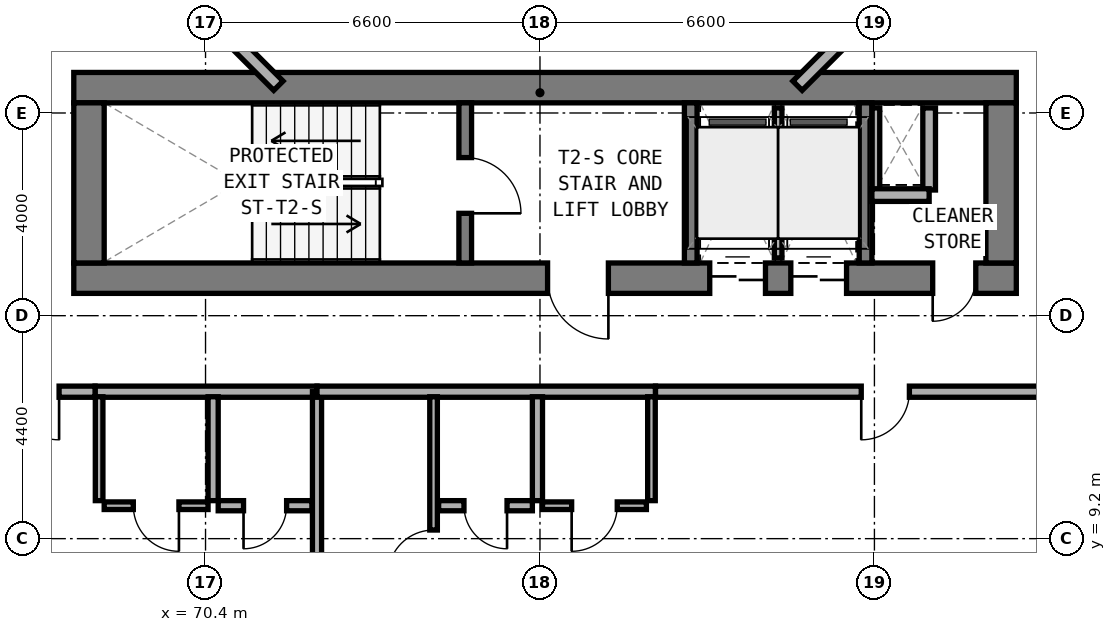
"""IFC4 building model, lengths in metres.
Left out: names, types, materials, properties, quantities, classifications, styles, units other than length and angle.
Written with IfcOpenShell. Run it as: python <this file> out.ifc"""

import sys

from ifc_helpers import new_model, si_unit, direction, frame, frame_2d, origin, place, context, subcontext, project, spatial, rectangle, extrude, element, fill, save


model = new_model("IFC4")
c1 = context("Model", 3, precision=1e-05, world=origin(), true_north=direction((0.0, 1.0)))
c2 = subcontext(c1, "Body", "Model", "MODEL_VIEW")
j1 = project(units=[si_unit("LENGTHUNIT", "METRE"), si_unit("PLANEANGLEUNIT", "RADIAN")], contexts=[c1])
p1 = place(None, origin())
s1 = spatial("IfcSite", under=j1, at=p1, CompositionType="ELEMENT")
p2 = place(p1, origin())
s2 = spatial("IfcBuilding", under=s1, at=p2, CompositionType="ELEMENT")
p3 = place(p2, frame((0.0, 0.0, 27.5)))
s3 = spatial("IfcBuildingStorey", under=s2, at=p3, CompositionType="ELEMENT", Elevation=27.5)
p4 = place(p3, frame((67.8, 14.34, 0.0), z_axis=(0.0, 0.0, 1.0), x_axis=(1.0, 0.0, 0.0)))
e1 = element("IfcWall", 1, at=p4, inside=s3, PredefinedType="SHEAR", context=c2, shape_type="SweptSolid", body=[
    extrude(rectangle(XDim=18.6, YDim=0.6, at=frame_2d((9.3, 0.0))), origin(), (0.0, 0.0, 1.0), 3.5),
])
p5 = place(p4, frame((9.35, 0.0, 0.0)))
e2 = element("IfcOpeningElement", 2, at=p5, cuts=e1, PredefinedType="OPENING", context=c2, shape_type="SweptSolid", body=[
    extrude(rectangle(XDim=1.2, YDim=2.15, at=frame_2d((0.6, 1.075))), frame((0.0, 0.31, 0.0), z_axis=(0.0, -1.0, 0.0), x_axis=(1.0, 0.0, 0.0)), (0.0, 0.0, 1.0), 0.62),
])
p6 = place(p4, frame((16.95, 0.0, 0.0)))
e3 = element("IfcOpeningElement", 3, at=p6, cuts=e1, PredefinedType="OPENING", context=c2, shape_type="SweptSolid", body=[
    extrude(rectangle(XDim=0.85, YDim=2.1, at=frame_2d((0.425, 1.05))), frame((0.0, 0.31, 0.0), z_axis=(0.0, -1.0, 0.0), x_axis=(1.0, 0.0, 0.0)), (0.0, 0.0, 1.0), 0.62),
])
p7 = place(p4, frame((12.55, 0.0, 0.0)))
e4 = element("IfcOpeningElement", 4, at=p7, cuts=e1, PredefinedType="OPENING", context=c2, shape_type="SweptSolid", body=[
    extrude(rectangle(XDim=1.1, YDim=2.15, at=frame_2d((0.55, 1.075))), frame((0.0, 0.31, 0.0), z_axis=(0.0, -1.0, 0.0), x_axis=(1.0, 0.0, 0.0)), (0.0, 0.0, 1.0), 0.62),
])
p8 = place(p4, frame((14.15, 0.0, 0.0)))
e5 = element("IfcOpeningElement", 5, at=p8, cuts=e1, PredefinedType="OPENING", context=c2, shape_type="SweptSolid", body=[
    extrude(rectangle(XDim=1.1, YDim=2.15, at=frame_2d((0.55, 1.075))), frame((0.0, 0.31, 0.0), z_axis=(0.0, -1.0, 0.0), x_axis=(1.0, 0.0, 0.0)), (0.0, 0.0, 1.0), 0.62),
])
p9 = place(p3, frame((67.8, 18.1, 0.0), z_axis=(0.0, 0.0, 1.0), x_axis=(1.0, 0.0, 0.0)))
e6 = element("IfcWall", 6, at=p9, inside=s3, PredefinedType="SHEAR", context=c2, shape_type="SweptSolid", body=[
    extrude(rectangle(XDim=18.6, YDim=0.6, at=frame_2d((9.3, 0.0))), origin(), (0.0, 0.0, 1.0), 3.5),
])
for number, where, z_axis, x_axis in (
    (7, (68.1, 14.64, 0.0), (0.0, 0.0, 1.0), (0.0, 1.0, 0.0)),
    (8, (86.1, 14.64, 0.0), (0.0, 0.0, 1.0), (0.0, 1.0, 0.0)),
):
    element("IfcWall", number, at=place(p3, frame(where, z_axis=z_axis, x_axis=x_axis)), inside=s3, PredefinedType="SHEAR", context=c2, shape_type="SweptSolid", body=[
        extrude(rectangle(XDim=3.16, YDim=0.6, at=frame_2d((1.58, 0.0))), origin(), (0.0, 0.0, 1.0), 3.5),
    ])
p10 = place(p3, frame((75.525, 14.64, 0.0), z_axis=(0.0, 0.0, 1.0), x_axis=(0.0, 1.0, 0.0)))
e9 = element("IfcWall", 9, at=p10, inside=s3, PredefinedType="STANDARD", context=c2, shape_type="SweptSolid", body=[
    extrude(rectangle(XDim=3.16, YDim=0.25, at=frame_2d((1.58, 0.0))), origin(), (0.0, 0.0, 1.0), 3.25),
])
p11 = place(p10, frame((0.98, 0.0, 0.0)))
e10 = element("IfcOpeningElement", 10, at=p11, cuts=e9, PredefinedType="OPENING", context=c2, shape_type="SweptSolid", body=[
    extrude(rectangle(XDim=1.1, YDim=2.15, at=frame_2d((0.55, 1.075))), frame((0.0, 0.135, 0.0), z_axis=(0.0, -1.0, 0.0), x_axis=(1.0, 0.0, 0.0)), (0.0, 0.0, 1.0), 0.27),
])
for number, where, z_axis, x_axis in (
    (11, (79.975, 14.64, 0.0), (0.0, 0.0, 1.0), (0.0, 1.0, 0.0)),
    (12, (83.425, 14.64, 0.0), (0.0, 0.0, 1.0), (0.0, 1.0, 0.0)),
):
    element("IfcWall", number, at=place(p3, frame(where, z_axis=z_axis, x_axis=x_axis)), inside=s3, PredefinedType="STANDARD", context=c2, shape_type="SweptSolid", body=[
        extrude(rectangle(XDim=3.16, YDim=0.25, at=frame_2d((1.58, 0.0))), origin(), (0.0, 0.0, 1.0), 3.25),
    ])
for number, where, z_axis, x_axis in (
    (13, (82.082, 18.138, 0.0), (0.0, 0.0, 1.0), (0.707, 0.707, 0.0)),
    (14, (70.204, 19.772, 0.0), (0.0, 0.0, 1.0), (0.707, -0.707, 0.0)),
):
    element("IfcWall", number, at=place(p3, frame(where, z_axis=z_axis, x_axis=x_axis)), inside=s3, PredefinedType="STANDARD", context=c2, shape_type="SweptSolid", body=[
        extrude(rectangle(XDim=2.311, YDim=0.26, at=frame_2d((1.155, 0.0))), origin(), (0.0, 0.0, 1.0), 3.25),
    ])
p12 = place(p3, frame((83.63, 16.08, 0.0), z_axis=(0.0, 0.0, 1.0), x_axis=(0.0, 1.0, 0.0)))
e15 = element("IfcWall", 15, at=p12, inside=s3, PredefinedType="PARTITIONING", context=c2, shape_type="SweptSolid", body=[
    extrude(rectangle(XDim=1.62, YDim=0.15, at=frame_2d((0.81, 0.0))), origin(), (0.0, 0.0, 1.0), 2.725),
])
p13 = place(p3, frame((84.68, 16.08, 0.0), z_axis=(0.0, 0.0, 1.0), x_axis=(0.0, 1.0, 0.0)))
e16 = element("IfcWall", 16, at=p13, inside=s3, PredefinedType="SOLIDWALL", context=c2, shape_type="SweptSolid", body=[
    extrude(rectangle(XDim=1.62, YDim=0.25, at=frame_2d((0.81, 0.0))), origin(), (0.0, 0.0, 1.0), 3.22),
])
p14 = place(p3, frame((83.55, 15.98, 0.0), z_axis=(0.0, 0.0, 1.0), x_axis=(1.0, 0.0, 0.0)))
e17 = element("IfcWall", 17, at=p14, inside=s3, PredefinedType="SOLIDWALL", context=c2, shape_type="SweptSolid", body=[
    extrude(rectangle(XDim=1.13, YDim=0.25, at=frame_2d((0.565, 0.0))), origin(), (0.0, 0.0, 1.0), 3.22),
])
p15 = place(p3, frame((81.7, 14.74, 0.0), z_axis=(0.0, 0.0, 1.0), x_axis=(0.0, 1.0, 0.0)))
e18 = element("IfcWall", 18, at=p15, inside=s3, PredefinedType="PARTITIONING", context=c2, shape_type="SweptSolid", body=[
    extrude(rectangle(XDim=2.96, YDim=0.15, at=frame_2d((1.48, 0.0))), origin(), (0.0, 0.0, 1.0), 3.22),
])
p16 = place(p3, frame((68.22, 12.1, 0.0), z_axis=(0.0, 0.0, 1.0), x_axis=(1.0, 0.0, 0.0)))
e19 = element("IfcWall", 19, at=p16, inside=s3, PredefinedType="SOLIDWALL", context=c2, shape_type="SweptSolid", body=[
    extrude(rectangle(XDim=4.38, YDim=0.22, at=frame_2d((2.19, 0.0))), origin(), (0.0, 0.0, 1.0), 2.725),
])
p17 = place(p3, frame((65.85, 12.1, 0.0), z_axis=(0.0, 0.0, 1.0), x_axis=(1.0, 0.0, 0.0)))
e20 = element("IfcWall", 20, at=p17, inside=s3, PredefinedType="SOLIDWALL", context=c2, shape_type="SweptSolid", body=[
    extrude(rectangle(XDim=2.37, YDim=0.22, at=frame_2d((1.185, 0.0))), origin(), (0.0, 0.0, 1.0), 3.22),
])
p18 = place(p17, frame((0.71, 0.0, 0.0)))
e21 = element("IfcOpeningElement", 21, at=p18, cuts=e20, PredefinedType="OPENING", context=c2, shape_type="SweptSolid", body=[
    extrude(rectangle(XDim=0.95, YDim=2.1, at=frame_2d((0.475, 1.05))), frame((0.0, 0.12, 0.0), z_axis=(0.0, -1.0, 0.0), x_axis=(1.0, 0.0, 0.0)), (0.0, 0.0, 1.0), 0.24),
])
p19 = place(p3, frame((70.55, 9.95, 0.0), z_axis=(0.0, 0.0, 1.0), x_axis=(0.0, 1.0, 0.0)))
e22 = element("IfcWall", 22, at=p19, inside=s3, PredefinedType="PLUMBINGWALL", context=c2, shape_type="SweptSolid", body=[
    extrude(rectangle(XDim=2.05, YDim=0.2, at=frame_2d((1.025, 0.0))), origin(), (0.0, 0.0, 1.0), 3.22),
])
p20 = place(p3, frame((68.3, 9.95, 0.0), z_axis=(0.0, 0.0, 1.0), x_axis=(0.0, 1.0, 0.0)))
e23 = element("IfcWall", 23, at=p20, inside=s3, PredefinedType="PARTITIONING", context=c2, shape_type="SweptSolid", body=[
    extrude(rectangle(XDim=2.05, YDim=0.15, at=frame_2d((1.025, 0.0))), origin(), (0.0, 0.0, 1.0), 3.22),
])
p21 = place(p3, frame((70.65, 9.85, 0.0), z_axis=(0.0, 0.0, 1.0), x_axis=(1.0, 0.0, 0.0)))
e24 = element("IfcWall", 24, at=p21, inside=s3, PredefinedType="PLUMBINGWALL", context=c2, shape_type="SweptSolid", body=[
    extrude(rectangle(XDim=1.85, YDim=0.2, at=frame_2d((0.925, 0.0))), origin(), (0.0, 0.0, 1.0), 3.22),
])
p22 = place(p21, frame((0.5, 0.0, 0.0)))
e25 = element("IfcOpeningElement", 25, at=p22, cuts=e24, PredefinedType="OPENING", context=c2, shape_type="SweptSolid", body=[
    extrude(rectangle(XDim=0.85, YDim=2.1, at=frame_2d((0.425, 1.05))), frame((0.0, 0.11, 0.0), z_axis=(0.0, -1.0, 0.0), x_axis=(1.0, 0.0, 0.0)), (0.0, 0.0, 1.0), 0.22),
])
p23 = place(p3, frame((68.4, 9.85, 0.0), z_axis=(0.0, 0.0, 1.0), x_axis=(1.0, 0.0, 0.0)))
e26 = element("IfcWall", 26, at=p23, inside=s3, PredefinedType="PARTITIONING", context=c2, shape_type="SweptSolid", body=[
    extrude(rectangle(XDim=2.05, YDim=0.15, at=frame_2d((1.025, 0.0))), origin(), (0.0, 0.0, 1.0), 3.22),
])
p24 = place(p23, frame((0.575, 0.0, 0.0)))
e27 = element("IfcOpeningElement", 27, at=p24, cuts=e26, PredefinedType="OPENING", context=c2, shape_type="SweptSolid", body=[
    extrude(rectangle(XDim=0.9, YDim=2.1, at=frame_2d((0.45, 1.05))), frame((0.0, 0.085, 0.0), z_axis=(0.0, -1.0, 0.0), x_axis=(1.0, 0.0, 0.0)), (0.0, 0.0, 1.0), 0.17),
])
p25 = place(p3, frame((72.6, 5.06, 0.0), z_axis=(0.0, 0.0, 1.0), x_axis=(0.0, 1.0, 0.0)))
e28 = element("IfcWall", 28, at=p25, inside=s3, PredefinedType="SOLIDWALL", context=c2, shape_type="SweptSolid", body=[
    extrude(rectangle(XDim=7.04, YDim=0.18, at=frame_2d((3.52, 0.0))), origin(), (0.0, 0.0, 1.0), 2.725),
])
p26 = place(p3, frame((72.6, 12.1, 0.0), z_axis=(0.0, 0.0, 1.0), x_axis=(1.0, 0.0, 0.0)))
e29 = element("IfcWall", 29, at=p26, inside=s3, PredefinedType="SOLIDWALL", context=c2, shape_type="SweptSolid", body=[
    extrude(rectangle(XDim=6.68, YDim=0.22, at=frame_2d((3.34, 0.0))), origin(), (0.0, 0.0, 1.0), 2.725),
])
p27 = place(p3, frame((79.28, 12.1, 0.0), z_axis=(0.0, 0.0, 1.0), x_axis=(1.0, 0.0, 0.0)))
e30 = element("IfcWall", 30, at=p27, inside=s3, PredefinedType="SOLIDWALL", context=c2, shape_type="SweptSolid", body=[
    extrude(rectangle(XDim=9.07, YDim=0.22, at=frame_2d((4.535, 0.0))), origin(), (0.0, 0.0, 1.0), 2.725),
])
p28 = place(p27, frame((4.06, 0.0, 0.0)))
e31 = element("IfcOpeningElement", 31, at=p28, cuts=e30, PredefinedType="OPENING", context=c2, shape_type="SweptSolid", body=[
    extrude(rectangle(XDim=0.95, YDim=2.1, at=frame_2d((0.475, 1.05))), frame((0.0, 0.12, 0.0), z_axis=(0.0, -1.0, 0.0), x_axis=(1.0, 0.0, 0.0)), (0.0, 0.0, 1.0), 0.24),
])
p29 = place(p3, frame((74.9, 5.16, 0.0), z_axis=(0.0, 0.0, 1.0), x_axis=(0.0, 1.0, 0.0)))
e32 = element("IfcWall", 32, at=p29, inside=s3, PredefinedType="PARTITIONING", context=c2, shape_type="SweptSolid", body=[
    extrude(rectangle(XDim=6.84, YDim=0.15, at=frame_2d((3.42, 0.0))), origin(), (0.0, 0.0, 1.0), 2.775),
])
p30 = place(p29, frame((3.31, 0.0, 0.0)))
e33 = element("IfcOpeningElement", 33, at=p30, cuts=e32, PredefinedType="OPENING", context=c2, shape_type="SweptSolid", body=[
    extrude(rectangle(XDim=0.9, YDim=2.1, at=frame_2d((0.45, 1.05))), frame((0.0, 0.085, 0.0), z_axis=(0.0, -1.0, 0.0), x_axis=(1.0, 0.0, 0.0)), (0.0, 0.0, 1.0), 0.17),
])
p31 = place(p3, frame((76.95, 9.95, 0.0), z_axis=(0.0, 0.0, 1.0), x_axis=(0.0, 1.0, 0.0)))
e34 = element("IfcWall", 34, at=p31, inside=s3, PredefinedType="PLUMBINGWALL", context=c2, shape_type="SweptSolid", body=[
    extrude(rectangle(XDim=2.05, YDim=0.2, at=frame_2d((1.025, 0.0))), origin(), (0.0, 0.0, 1.0), 2.775),
])
p32 = place(p3, frame((79.2, 9.95, 0.0), z_axis=(0.0, 0.0, 1.0), x_axis=(0.0, 1.0, 0.0)))
e35 = element("IfcWall", 35, at=p32, inside=s3, PredefinedType="PARTITIONING", context=c2, shape_type="SweptSolid", body=[
    extrude(rectangle(XDim=2.05, YDim=0.15, at=frame_2d((1.025, 0.0))), origin(), (0.0, 0.0, 1.0), 2.775),
])
p33 = place(p3, frame((75.0, 9.85, 0.0), z_axis=(0.0, 0.0, 1.0), x_axis=(1.0, 0.0, 0.0)))
e36 = element("IfcWall", 36, at=p33, inside=s3, PredefinedType="PLUMBINGWALL", context=c2, shape_type="SweptSolid", body=[
    extrude(rectangle(XDim=1.85, YDim=0.2, at=frame_2d((0.925, 0.0))), origin(), (0.0, 0.0, 1.0), 3.22),
])
p34 = place(p33, frame((0.5, 0.0, 0.0)))
e37 = element("IfcOpeningElement", 37, at=p34, cuts=e36, PredefinedType="OPENING", context=c2, shape_type="SweptSolid", body=[
    extrude(rectangle(XDim=0.85, YDim=2.1, at=frame_2d((0.425, 1.05))), frame((0.0, 0.11, 0.0), z_axis=(0.0, -1.0, 0.0), x_axis=(1.0, 0.0, 0.0)), (0.0, 0.0, 1.0), 0.22),
])
p35 = place(p3, frame((77.05, 9.85, 0.0), z_axis=(0.0, 0.0, 1.0), x_axis=(1.0, 0.0, 0.0)))
e38 = element("IfcWall", 38, at=p35, inside=s3, PredefinedType="PARTITIONING", context=c2, shape_type="SweptSolid", body=[
    extrude(rectangle(XDim=2.05, YDim=0.15, at=frame_2d((1.025, 0.0))), origin(), (0.0, 0.0, 1.0), 3.22),
])
p36 = place(p35, frame((0.575, 0.0, 0.0)))
e39 = element("IfcOpeningElement", 39, at=p36, cuts=e38, PredefinedType="OPENING", context=c2, shape_type="SweptSolid", body=[
    extrude(rectangle(XDim=0.9, YDim=2.1, at=frame_2d((0.45, 1.05))), frame((0.0, 0.085, 0.0), z_axis=(0.0, -1.0, 0.0), x_axis=(1.0, 0.0, 0.0)), (0.0, 0.0, 1.0), 0.17),
])
p37 = place(p11, frame((1.1, 0.0, 0.0), z_axis=(0.0, 0.0, 1.0), x_axis=(-1.0, 0.0, 0.0)))
e40 = element("IfcDoor", 40, at=p37, inside=s3, OperationType="SINGLE_SWING_RIGHT", PredefinedType="DOOR", context=c2, shape_type="SweptSolid", body=[
    extrude(rectangle(XDim=1.1, YDim=2.15, at=frame_2d((0.55, 1.075))), frame((0.0, 0.025, 0.0), z_axis=(0.0, -1.0, 0.0), x_axis=(1.0, 0.0, 0.0)), (0.0, 0.0, 1.0), 0.05),
])
fill(e10, e40)
p38 = place(p5, frame((1.2, 0.0, 0.0), z_axis=(0.0, 0.0, 1.0), x_axis=(-1.0, 0.0, 0.0)))
e41 = element("IfcDoor", 41, at=p38, inside=s3, OperationType="SINGLE_SWING_LEFT", PredefinedType="DOOR", context=c2, shape_type="SweptSolid", body=[
    extrude(rectangle(XDim=1.2, YDim=2.15, at=frame_2d((0.6, 1.075))), frame((0.0, 0.025, 0.0), z_axis=(0.0, -1.0, 0.0), x_axis=(1.0, 0.0, 0.0)), (0.0, 0.0, 1.0), 0.05),
])
fill(e2, e41)
p39 = place(p6, frame((0.85, 0.0, 0.0), z_axis=(0.0, 0.0, 1.0), x_axis=(-1.0, 0.0, 0.0)))
e42 = element("IfcDoor", 42, at=p39, inside=s3, OperationType="SINGLE_SWING_RIGHT", PredefinedType="DOOR", context=c2, shape_type="SweptSolid", body=[
    extrude(rectangle(XDim=0.85, YDim=2.1, at=frame_2d((0.425, 1.05))), frame((0.0, 0.025, 0.0), z_axis=(0.0, -1.0, 0.0), x_axis=(1.0, 0.0, 0.0)), (0.0, 0.0, 1.0), 0.05),
])
fill(e3, e42)
p40 = place(p7, frame((1.1, 0.0, 0.0), z_axis=(0.0, 0.0, 1.0), x_axis=(-1.0, 0.0, 0.0)))
e43 = element("IfcDoor", 43, at=p40, inside=s3, OperationType="DOUBLE_DOOR_SLIDING", PredefinedType="DOOR", context=c2, shape_type="SweptSolid", body=[
    extrude(rectangle(XDim=1.1, YDim=2.15, at=frame_2d((0.55, 1.075))), frame((0.0, 0.025, 0.0), z_axis=(0.0, -1.0, 0.0), x_axis=(1.0, 0.0, 0.0)), (0.0, 0.0, 1.0), 0.05),
])
fill(e4, e43)
p41 = place(p8, frame((1.1, 0.0, 0.0), z_axis=(0.0, 0.0, 1.0), x_axis=(-1.0, 0.0, 0.0)))
e44 = element("IfcDoor", 44, at=p41, inside=s3, OperationType="DOUBLE_DOOR_SLIDING", PredefinedType="DOOR", context=c2, shape_type="SweptSolid", body=[
    extrude(rectangle(XDim=1.1, YDim=2.15, at=frame_2d((0.55, 1.075))), frame((0.0, 0.025, 0.0), z_axis=(0.0, -1.0, 0.0), x_axis=(1.0, 0.0, 0.0)), (0.0, 0.0, 1.0), 0.05),
])
fill(e5, e44)
p42 = place(p18, frame((0.95, 0.0, 0.0), z_axis=(0.0, 0.0, 1.0), x_axis=(-1.0, 0.0, 0.0)))
e45 = element("IfcDoor", 45, at=p42, inside=s3, OperationType="SINGLE_SWING_LEFT", PredefinedType="DOOR", context=c2, shape_type="SweptSolid", body=[
    extrude(rectangle(XDim=0.95, YDim=2.1, at=frame_2d((0.475, 1.05))), frame((0.0, 0.025, 0.0), z_axis=(0.0, -1.0, 0.0), x_axis=(1.0, 0.0, 0.0)), (0.0, 0.0, 1.0), 0.05),
])
fill(e21, e45)
p43 = place(p22, frame((0.85, 0.0, 0.0), z_axis=(0.0, 0.0, 1.0), x_axis=(-1.0, 0.0, 0.0)))
e46 = element("IfcDoor", 46, at=p43, inside=s3, OperationType="SINGLE_SWING_RIGHT", PredefinedType="DOOR", context=c2, shape_type="SweptSolid", body=[
    extrude(rectangle(XDim=0.85, YDim=2.1, at=frame_2d((0.425, 1.05))), frame((0.0, 0.025, 0.0), z_axis=(0.0, -1.0, 0.0), x_axis=(1.0, 0.0, 0.0)), (0.0, 0.0, 1.0), 0.05),
])
fill(e25, e46)
p44 = place(p24, frame((0.9, 0.0, 0.0), z_axis=(0.0, 0.0, 1.0), x_axis=(-1.0, 0.0, 0.0)))
e47 = element("IfcDoor", 47, at=p44, inside=s3, OperationType="SINGLE_SWING_LEFT", PredefinedType="DOOR", context=c2, shape_type="SweptSolid", body=[
    extrude(rectangle(XDim=0.9, YDim=2.1, at=frame_2d((0.45, 1.05))), frame((0.0, 0.025, 0.0), z_axis=(0.0, -1.0, 0.0), x_axis=(1.0, 0.0, 0.0)), (0.0, 0.0, 1.0), 0.05),
])
fill(e27, e47)
p45 = place(p28, frame((0.95, 0.0, 0.0), z_axis=(0.0, 0.0, 1.0), x_axis=(-1.0, 0.0, 0.0)))
e48 = element("IfcDoor", 48, at=p45, inside=s3, OperationType="SINGLE_SWING_RIGHT", PredefinedType="DOOR", context=c2, shape_type="SweptSolid", body=[
    extrude(rectangle(XDim=0.95, YDim=2.1, at=frame_2d((0.475, 1.05))), frame((0.0, 0.025, 0.0), z_axis=(0.0, -1.0, 0.0), x_axis=(1.0, 0.0, 0.0)), (0.0, 0.0, 1.0), 0.05),
])
fill(e31, e48)
p46 = place(p30, origin())
e49 = element("IfcDoor", 49, at=p46, inside=s3, OperationType="SINGLE_SWING_LEFT", PredefinedType="DOOR", context=c2, shape_type="SweptSolid", body=[
    extrude(rectangle(XDim=0.9, YDim=2.1, at=frame_2d((0.45, 1.05))), frame((0.0, 0.025, 0.0), z_axis=(0.0, -1.0, 0.0), x_axis=(1.0, 0.0, 0.0)), (0.0, 0.0, 1.0), 0.05),
])
fill(e33, e49)
p47 = place(p34, frame((0.85, 0.0, 0.0), z_axis=(0.0, 0.0, 1.0), x_axis=(-1.0, 0.0, 0.0)))
e50 = element("IfcDoor", 50, at=p47, inside=s3, OperationType="SINGLE_SWING_LEFT", PredefinedType="DOOR", context=c2, shape_type="SweptSolid", body=[
    extrude(rectangle(XDim=0.85, YDim=2.1, at=frame_2d((0.425, 1.05))), frame((0.0, 0.025, 0.0), z_axis=(0.0, -1.0, 0.0), x_axis=(1.0, 0.0, 0.0)), (0.0, 0.0, 1.0), 0.05),
])
fill(e37, e50)
p48 = place(p36, frame((0.9, 0.0, 0.0), z_axis=(0.0, 0.0, 1.0), x_axis=(-1.0, 0.0, 0.0)))
e51 = element("IfcDoor", 51, at=p48, inside=s3, OperationType="SINGLE_SWING_RIGHT", PredefinedType="DOOR", context=c2, shape_type="SweptSolid", body=[
    extrude(rectangle(XDim=0.9, YDim=2.1, at=frame_2d((0.45, 1.05))), frame((0.0, 0.025, 0.0), z_axis=(0.0, -1.0, 0.0), x_axis=(1.0, 0.0, 0.0)), (0.0, 0.0, 1.0), 0.05),
])
fill(e39, e51)
save(model, sys.argv[1])
